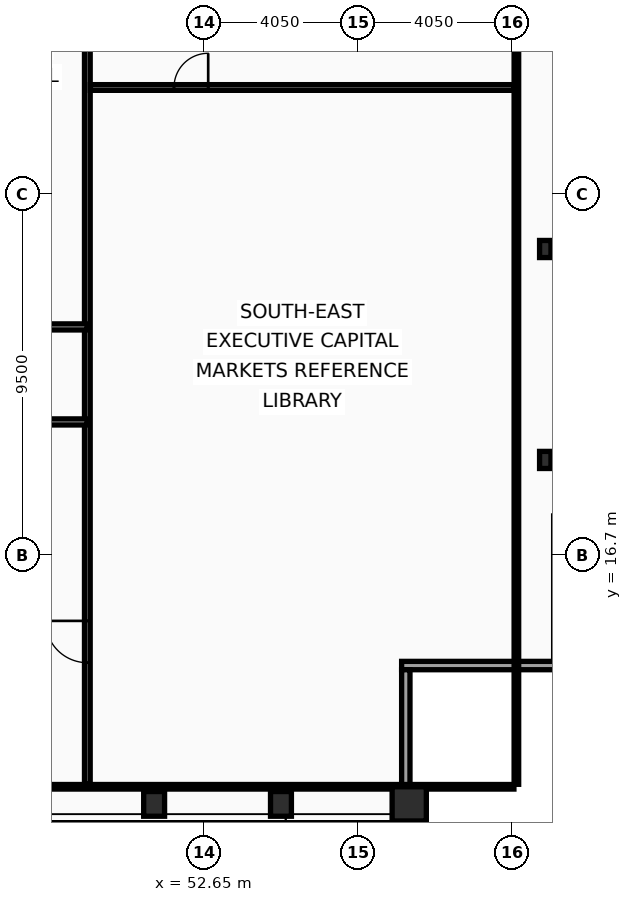
"""IFC4 building model, lengths in metres.
Left out: names, types, materials, properties, quantities, classifications, styles, units other than length and angle.
Written with IfcOpenShell. Run it as: python <this file> out.ifc"""

import sys

from ifc_helpers import new_model, si_unit, direction, frame, frame_2d, origin, origin_2d, place, context, subcontext, project, spatial, rectangle, hollow_rectangle, i_section, extrude, element, fill, save


model = new_model("IFC4")
c1 = context("Model", 3, precision=1e-05, world=origin(), true_north=direction((0.0, 1.0)))
c2 = subcontext(c1, "Body", "Model", "MODEL_VIEW")
j1 = project(units=[si_unit("LENGTHUNIT", "METRE"), si_unit("PLANEANGLEUNIT", "RADIAN")], contexts=[c1])
p1 = place(None, origin())
s1 = spatial("IfcSite", under=j1, at=p1, CompositionType="ELEMENT")
p2 = place(p1, origin())
s2 = spatial("IfcBuilding", under=s1, at=p2, CompositionType="ELEMENT")
p3 = place(p2, frame((0.0, 0.0, 302.2)))
s3 = spatial("IfcBuildingStorey", under=s2, at=p3, CompositionType="ELEMENT", Elevation=302.2)
p4 = place(p3, frame((58.05, 10.15, 0.0), z_axis=(0.0, 0.0, 1.0), x_axis=(1.0, 0.0, 0.0)))
e1 = element("IfcColumn", 1, at=p4, inside=s3, PredefinedType="COLUMN", context=c2, shape_type="SweptSolid", body=[
    extrude(hollow_rectangle(XDim=0.9, YDim=0.9, WallThickness=0.05, at=origin_2d()), origin(), (0.0, 0.0, 1.0), 3.6),
])
for number, where, z_axis, x_axis in (
    (2, (51.337, 10.15, 0.0), (0.0, 0.0, 1.0), (1.0, 0.0, 0.0)),
    (3, (54.675, 10.15, 0.0), (0.0, 0.0, 1.0), (1.0, 0.0, 0.0)),
):
    element("IfcColumn", number, at=place(p3, frame(where, z_axis=z_axis, x_axis=x_axis)), inside=s3, PredefinedType="COLUMN", context=c2, shape_type="SweptSolid", body=[
        extrude(hollow_rectangle(XDim=0.55, YDim=0.65, WallThickness=0.04, at=origin_2d()), origin(), (0.0, 0.0, 1.0), 3.6),
    ])
for number, where, z_axis, x_axis in (
    (4, (61.63, 19.2, 0.0), (0.0, 0.0, 1.0), (1.0, 0.0, 0.0)),
    (5, (61.63, 24.75, 0.0), (0.0, 0.0, 1.0), (1.0, 0.0, 0.0)),
):
    element("IfcColumn", number, at=place(p3, frame(where, z_axis=z_axis, x_axis=x_axis)), inside=s3, PredefinedType="COLUMN", context=c2, shape_type="SweptSolid", body=[
        extrude(i_section(OverallWidth=0.3, OverallDepth=0.45, WebThickness=0.014, FlangeThickness=0.026, at=origin_2d()), origin(), (0.0, 0.0, 1.0), 3.6),
    ])
p5 = place(p3, frame((62.07, 13.79, 0.0), z_axis=(0.0, 0.0, 1.0), x_axis=(-1.0, 0.0, 0.0)))
e6 = element("IfcWall", 6, at=p5, inside=s3, PredefinedType="SOLIDWALL", context=c2, shape_type="SweptSolid", body=[
    extrude(rectangle(XDim=4.22, YDim=0.22, at=frame_2d((2.11, 0.0))), origin(), (0.0, 0.0, 1.0), 2.82),
])
p6 = place(p3, frame((57.96, 13.68, 0.0), z_axis=(0.0, 0.0, 1.0), x_axis=(0.0, -1.0, 0.0)))
e7 = element("IfcWall", 7, at=p6, inside=s3, PredefinedType="SOLIDWALL", context=c2, shape_type="SweptSolid", body=[
    extrude(rectangle(XDim=3.91, YDim=0.22, at=frame_2d((1.955, 0.0))), origin(), (0.0, 0.0, 1.0), 2.82),
])
p7 = place(p3, frame((49.58, 10.665, 0.0), z_axis=(0.0, 0.0, 1.0), x_axis=(0.0, 1.0, 0.0)))
e8 = element("IfcWall", 8, at=p7, inside=s3, PredefinedType="PARTITIONING", context=c2, shape_type="SweptSolid", body=[
    extrude(rectangle(XDim=24.955, YDim=0.15, at=frame_2d((12.478, 0.0))), origin(), (0.0, 0.0, 1.0), 2.97),
])
p8 = place(p7, frame((3.2, 0.0, 0.0)))
e9 = element("IfcOpeningElement", 9, at=p8, cuts=e8, PredefinedType="OPENING", context=c2, shape_type="SweptSolid", body=[
    extrude(rectangle(XDim=1.1, YDim=2.1, at=frame_2d((0.55, 1.05))), frame((0.0, 0.085, 0.0), z_axis=(0.0, -1.0, 0.0), x_axis=(1.0, 0.0, 0.0)), (0.0, 0.0, 1.0), 0.17),
])
p9 = place(p3, frame((49.66, 29.0, 0.0), z_axis=(0.0, 0.0, 1.0), x_axis=(1.0, 0.0, 0.0)))
e10 = element("IfcWall", 10, at=p9, inside=s3, PredefinedType="PARTITIONING", context=c2, shape_type="SweptSolid", body=[
    extrude(rectangle(XDim=11.145, YDim=0.15, at=frame_2d((5.573, 0.0))), origin(), (0.0, 0.0, 1.0), 2.72),
])
p10 = place(p9, frame((2.2, 0.0, 0.0)))
e11 = element("IfcOpeningElement", 11, at=p10, cuts=e10, PredefinedType="OPENING", context=c2, shape_type="SweptSolid", body=[
    extrude(rectangle(XDim=0.9, YDim=2.05, at=frame_2d((0.45, 1.025))), frame((0.0, 0.085, 0.0), z_axis=(0.0, -1.0, 0.0), x_axis=(1.0, 0.0, 0.0)), (0.0, 0.0, 1.0), 0.17),
])
p11 = place(p3, frame((44.719, 22.7, 0.0), z_axis=(0.0, 0.0, 1.0), x_axis=(1.0, 0.0, 0.0)))
e12 = element("IfcWall", 12, at=p11, inside=s3, PredefinedType="PARTITIONING", context=c2, shape_type="SweptSolid", body=[
    extrude(rectangle(XDim=4.861, YDim=0.16, at=frame_2d((2.43, 0.0))), origin(), (0.0, 0.0, 1.0), 2.72),
])
p12 = place(p11, frame((2.292, 0.0, 0.0)))
e13 = element("IfcOpeningElement", 13, at=p12, cuts=e12, PredefinedType="OPENING", context=c2, shape_type="SweptSolid", body=[
    extrude(rectangle(XDim=1.0, YDim=2.05, at=frame_2d((0.5, 1.025))), frame((0.0, 0.09, 0.0), z_axis=(0.0, -1.0, 0.0), x_axis=(1.0, 0.0, 0.0)), (0.0, 0.0, 1.0), 0.18),
])
p13 = place(p3, frame((39.775, 20.2, 0.0), z_axis=(0.0, 0.0, 1.0), x_axis=(1.0, 0.0, 0.0)))
e14 = element("IfcWall", 14, at=p13, inside=s3, PredefinedType="PARTITIONING", context=c2, shape_type="SweptSolid", body=[
    extrude(rectangle(XDim=9.805, YDim=0.16, at=frame_2d((4.902, 0.0))), origin(), (0.0, 0.0, 1.0), 2.72),
])
p14 = place(p13, frame((4.368, 0.0, 0.0)))
e15 = element("IfcOpeningElement", 15, at=p14, cuts=e14, PredefinedType="OPENING", context=c2, shape_type="SweptSolid", body=[
    extrude(rectangle(XDim=1.0, YDim=2.05, at=frame_2d((0.5, 1.025))), frame((0.0, 0.09, 0.0), z_axis=(0.0, -1.0, 0.0), x_axis=(1.0, 0.0, 0.0)), (0.0, 0.0, 1.0), 0.18),
])
p15 = place(p3, frame((60.87, 10.665, 0.0), z_axis=(0.0, 0.0, 1.0), x_axis=(0.0, 1.0, 0.0)))
e16 = element("IfcWall", 16, at=p15, inside=s3, PredefinedType="PARTITIONING", context=c2, shape_type="SweptSolid", body=[
    extrude(rectangle(XDim=42.11, YDim=0.12, at=frame_2d((21.055, 0.0))), origin(), (0.0, 0.0, 1.0), 2.72),
])
p16 = place(p3, frame((12.095, 10.6, 0.0), z_axis=(0.0, 0.0, 1.0), x_axis=(1.0, 0.0, 0.0)))
e17 = element("IfcWall", 17, at=p16, inside=s3, PredefinedType="PARTITIONING", context=c2, shape_type="SweptSolid", body=[
    extrude(rectangle(XDim=48.71, YDim=0.12, at=frame_2d((24.355, 0.0))), origin(), (0.0, 0.0, 1.0), 2.72),
])
p17 = place(p8, origin())
e18 = element("IfcDoor", 18, at=p17, inside=s3, OperationType="SINGLE_SWING_RIGHT", PredefinedType="DOOR", context=c2, shape_type="SweptSolid", body=[
    extrude(rectangle(XDim=1.1, YDim=2.1, at=frame_2d((0.55, 1.05))), frame((0.0, 0.025, 0.0), z_axis=(0.0, -1.0, 0.0), x_axis=(1.0, 0.0, 0.0)), (0.0, 0.0, 1.0), 0.05),
])
fill(e9, e18)
p18 = place(p10, origin())
e19 = element("IfcDoor", 19, at=p18, inside=s3, OperationType="SINGLE_SWING_RIGHT", PredefinedType="DOOR", context=c2, shape_type="SweptSolid", body=[
    extrude(rectangle(XDim=0.9, YDim=2.05, at=frame_2d((0.45, 1.025))), frame((0.0, 0.025, 0.0), z_axis=(0.0, -1.0, 0.0), x_axis=(1.0, 0.0, 0.0)), (0.0, 0.0, 1.0), 0.05),
])
fill(e11, e19)
save(model, sys.argv[1])
